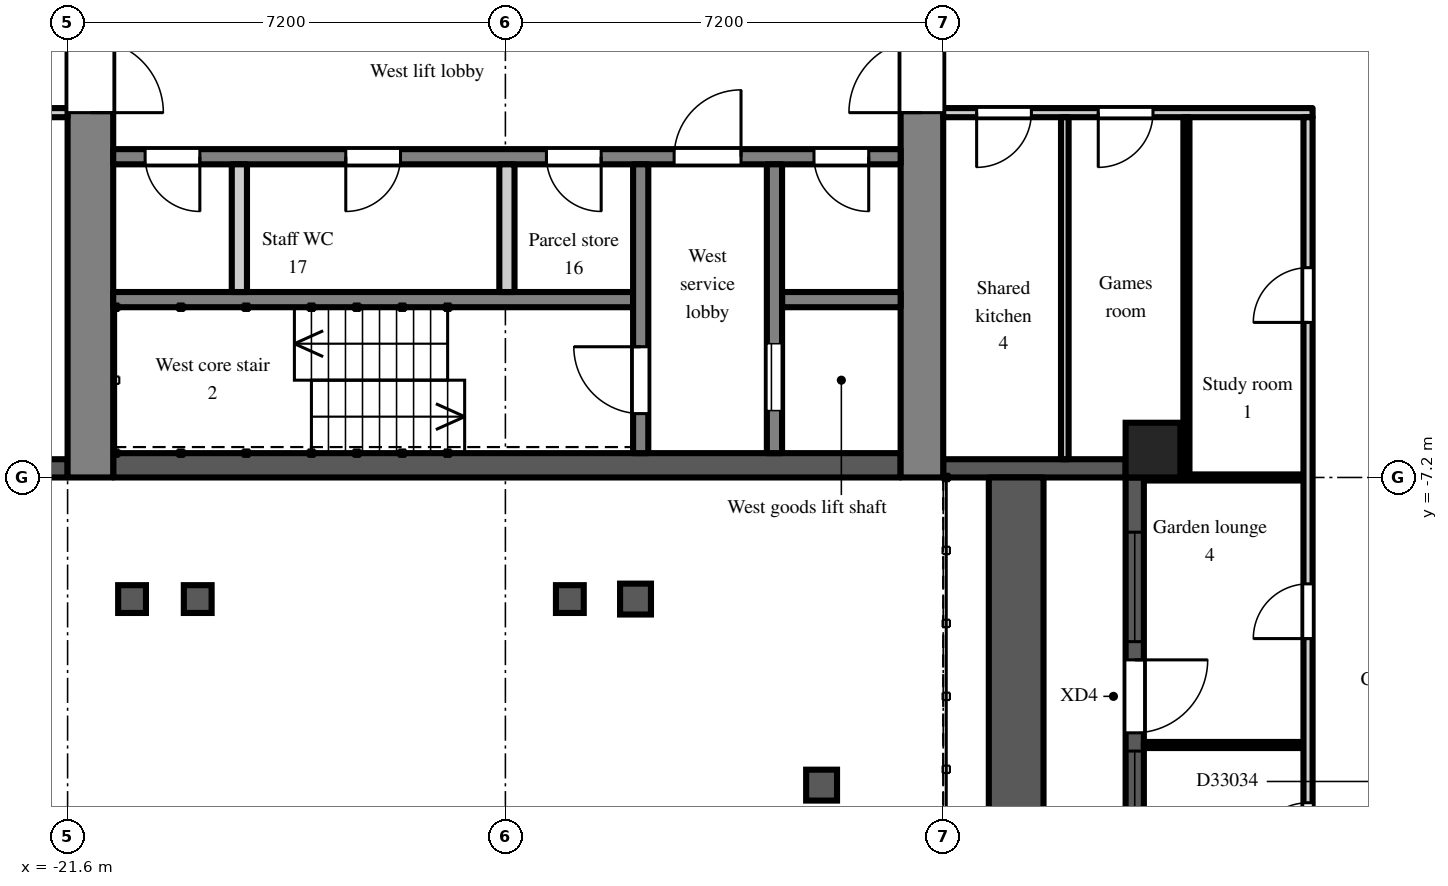
"""IFC4 building model, lengths in metres.
Left out: names, types, materials, properties, quantities, classifications, styles, units other than length and angle.
Written with IfcOpenShell. Run it as: python <this file> out.ifc"""

import sys

from ifc_helpers import new_model, si_unit, direction, frame, frame_2d, origin, origin_2d, place, context, subcontext, project, spatial, rectangle, extrude, element, fill, save


model = new_model("IFC4")
c1 = context("Model", 3, precision=1e-05, world=origin(), true_north=direction((0.0, 1.0)))
c2 = subcontext(c1, "Body", "Model", "MODEL_VIEW")
j1 = project(units=[si_unit("LENGTHUNIT", "METRE"), si_unit("PLANEANGLEUNIT", "RADIAN")], contexts=[c1])
p1 = place(None, origin())
s1 = spatial("IfcSite", under=j1, at=p1, CompositionType="ELEMENT")
p2 = place(p1, origin())
s2 = spatial("IfcBuilding", under=s1, at=p2, CompositionType="ELEMENT")
p3 = place(p2, frame((0.0, 0.0, 231.9)))
s3 = spatial("IfcBuildingStorey", under=s2, at=p3, CompositionType="ELEMENT", Elevation=231.9)
p4 = place(p3, frame((-3.75, -6.75, 0.0), z_axis=(0.0, 0.0, 1.0), x_axis=(1.0, 0.0, 0.0)))
e1 = element("IfcColumn", 1, at=p4, inside=s3, PredefinedType="COLUMN", context=c2, shape_type="SweptSolid", body=[
    extrude(rectangle(XDim=0.9, YDim=0.9, at=origin_2d()), origin(), (0.0, 0.0, 1.0), 3.0),
])
p5 = place(p3, frame((-24.3, -7.05, 0.0), z_axis=(0.0, 0.0, 1.0), x_axis=(1.0, 0.0, 0.0)))
e2 = element("IfcWall", 2, at=p5, inside=s3, PredefinedType="SOLIDWALL", context=c2, shape_type="SweptSolid", body=[
    extrude(rectangle(XDim=2.7, YDim=0.3, at=frame_2d((1.35, 0.0))), origin(), (0.0, 0.0, 1.0), 2.3),
])
p6 = place(p5, frame((0.75, 0.0, 0.2)))
e3 = element("IfcOpeningElement", 3, at=p6, cuts=e2, PredefinedType="OPENING", context=c2, shape_type="SweptSolid", body=[
    extrude(rectangle(XDim=1.2, YDim=1.85, at=frame_2d((0.6, 0.925))), frame((0.0, 0.16, 0.0), z_axis=(0.0, -1.0, 0.0), x_axis=(1.0, 0.0, 0.0)), (0.0, 0.0, 1.0), 0.32),
])
p7 = place(p3, frame((-7.2, -7.05, 0.0), z_axis=(0.0, 0.0, 1.0), x_axis=(1.0, 0.0, 0.0)))
e4 = element("IfcWall", 4, at=p7, inside=s3, PredefinedType="SOLIDWALL", context=c2, shape_type="SweptSolid", body=[
    extrude(rectangle(XDim=3.0, YDim=0.3, at=frame_2d((1.5, 0.0))), origin(), (0.0, 0.0, 1.0), 2.3),
])
p8 = place(p3, frame((-4.05, -7.2, 0.0), z_axis=(0.0, 0.0, 1.0), x_axis=(0.0, -1.0, 0.0)))
e5 = element("IfcWall", 5, at=p8, inside=s3, PredefinedType="SOLIDWALL", context=c2, shape_type="SweptSolid", body=[
    extrude(rectangle(XDim=7.2, YDim=0.3, at=frame_2d((3.6, 0.0))), origin(), (0.0, 0.0, 1.0), 2.3),
])
p9 = place(p8, frame((3.0, 0.0, 0.0)))
e6 = element("IfcOpeningElement", 6, at=p9, cuts=e5, PredefinedType="OPENING", context=c2, shape_type="SweptSolid", body=[
    extrude(rectangle(XDim=1.2, YDim=2.05, at=frame_2d((0.6, 1.025))), frame((0.0, 0.16, 0.0), z_axis=(0.0, -1.0, 0.0), x_axis=(1.0, 0.0, 0.0)), (0.0, 0.0, 1.0), 0.32),
])
p10 = place(p8, frame((0.9, 0.0, 0.2)))
e7 = element("IfcOpeningElement", 7, at=p10, cuts=e5, PredefinedType="OPENING", context=c2, shape_type="SweptSolid", body=[
    extrude(rectangle(XDim=1.8, YDim=1.85, at=frame_2d((0.9, 0.925))), frame((0.0, 0.16, 0.0), z_axis=(0.0, -1.0, 0.0), x_axis=(1.0, 0.0, 0.0)), (0.0, 0.0, 1.0), 0.32),
])
p11 = place(p8, frame((4.5, 0.0, 0.2)))
e8 = element("IfcOpeningElement", 8, at=p11, cuts=e5, PredefinedType="OPENING", context=c2, shape_type="SweptSolid", body=[
    extrude(rectangle(XDim=1.8, YDim=1.85, at=frame_2d((0.9, 0.925))), frame((0.0, 0.16, 0.0), z_axis=(0.0, -1.0, 0.0), x_axis=(1.0, 0.0, 0.0)), (0.0, 0.0, 1.0), 0.32),
])
p12 = place(p3, frame((-6.0, -14.4, 0.0), z_axis=(0.0, 0.0, 1.0), x_axis=(0.0, 1.0, 0.0)))
e9 = element("IfcWall", 9, at=p12, inside=s3, PredefinedType="PARAPET", context=c2, shape_type="SweptSolid", body=[
    extrude(rectangle(XDim=7.2, YDim=0.9, at=frame_2d((3.6, 0.0))), origin(), (0.0, 0.0, 1.0), 0.8),
])
p13 = place(p3, frame((-7.55, -7.2, 0.0), z_axis=(0.0, 0.0, 1.0), x_axis=(0.0, 1.0, 0.0)))
e10 = element("IfcWall", 10, at=p13, inside=s3, PredefinedType="SHEAR", context=c2, shape_type="SweptSolid", body=[
    extrude(rectangle(XDim=14.4, YDim=0.7, at=frame_2d((7.2, 0.0))), origin(), (0.0, 0.0, 1.0), 2.6),
])
p14 = place(p13, frame((6.0, 0.0, 0.0)))
e11 = element("IfcOpeningElement", 11, at=p14, cuts=e10, PredefinedType="OPENING", context=c2, shape_type="SweptSolid", body=[
    extrude(rectangle(XDim=2.4, YDim=2.2, at=frame_2d((1.2, 1.1))), frame((0.0, 0.36, 0.0), z_axis=(0.0, -1.0, 0.0), x_axis=(1.0, 0.0, 0.0)), (0.0, 0.0, 1.0), 0.72),
])
p15 = place(p3, frame((-21.225, -7.2, 0.0), z_axis=(0.0, 0.0, 1.0), x_axis=(0.0, 1.0, 0.0)))
e12 = element("IfcWall", 12, at=p15, inside=s3, PredefinedType="SHEAR", context=c2, shape_type="SweptSolid", body=[
    extrude(rectangle(XDim=14.4, YDim=0.75, at=frame_2d((7.2, 0.0))), origin(), (0.0, 0.0, 1.0), 2.6),
])
p16 = place(p15, frame((6.0, 0.0, 0.0)))
e13 = element("IfcOpeningElement", 13, at=p16, cuts=e12, PredefinedType="OPENING", context=c2, shape_type="SweptSolid", body=[
    extrude(rectangle(XDim=2.4, YDim=2.2, at=frame_2d((1.2, 1.1))), frame((0.0, 0.385, 0.0), z_axis=(0.0, -1.0, 0.0), x_axis=(1.0, 0.0, 0.0)), (0.0, 0.0, 1.0), 0.77),
])
p17 = place(p3, frame((-7.9, -7.0, 0.0), z_axis=(0.0, 0.0, 1.0), x_axis=(-1.0, 0.0, 0.0)))
e14 = element("IfcWall", 14, at=p17, inside=s3, PredefinedType="SHEAR", context=c2, shape_type="SweptSolid", body=[
    extrude(rectangle(XDim=12.95, YDim=0.4, at=frame_2d((6.475, 0.0))), origin(), (0.0, 0.0, 1.0), 2.6),
])
p18 = place(p3, frame((-7.9, -1.925, 0.0), z_axis=(0.0, 0.0, 1.0), x_axis=(-1.0, 0.0, 0.0)))
e15 = element("IfcWall", 15, at=p18, inside=s3, PredefinedType="SHEAR", context=c2, shape_type="SweptSolid", body=[
    extrude(rectangle(XDim=12.95, YDim=0.25, at=frame_2d((6.475, 0.0))), origin(), (0.0, 0.0, 1.0), 2.6),
])
p19 = place(p18, frame((0.525, 0.0, 0.0)))
e16 = element("IfcOpeningElement", 16, at=p19, cuts=e15, PredefinedType="OPENING", context=c2, shape_type="SweptSolid", body=[
    extrude(rectangle(XDim=0.9, YDim=2.1, at=frame_2d((0.45, 1.05))), frame((0.0, 0.135, 0.0), z_axis=(0.0, -1.0, 0.0), x_axis=(1.0, 0.0, 0.0)), (0.0, 0.0, 1.0), 0.27),
])
p20 = place(p18, frame((2.625, 0.0, 0.0)))
e17 = element("IfcOpeningElement", 17, at=p20, cuts=e15, PredefinedType="OPENING", context=c2, shape_type="SweptSolid", body=[
    extrude(rectangle(XDim=1.1, YDim=2.1, at=frame_2d((0.55, 1.05))), frame((0.0, 0.135, 0.0), z_axis=(0.0, -1.0, 0.0), x_axis=(1.0, 0.0, 0.0)), (0.0, 0.0, 1.0), 0.27),
])
p21 = place(p18, frame((4.925, 0.0, 0.0)))
e18 = element("IfcOpeningElement", 18, at=p21, cuts=e15, PredefinedType="OPENING", context=c2, shape_type="SweptSolid", body=[
    extrude(rectangle(XDim=0.9, YDim=2.1, at=frame_2d((0.45, 1.05))), frame((0.0, 0.135, 0.0), z_axis=(0.0, -1.0, 0.0), x_axis=(1.0, 0.0, 0.0)), (0.0, 0.0, 1.0), 0.27),
])
p22 = place(p18, frame((8.225, 0.0, 0.0)))
e19 = element("IfcOpeningElement", 19, at=p22, cuts=e15, PredefinedType="OPENING", context=c2, shape_type="SweptSolid", body=[
    extrude(rectangle(XDim=0.9, YDim=2.1, at=frame_2d((0.45, 1.05))), frame((0.0, 0.135, 0.0), z_axis=(0.0, -1.0, 0.0), x_axis=(1.0, 0.0, 0.0)), (0.0, 0.0, 1.0), 0.27),
])
p23 = place(p18, frame((11.525, 0.0, 0.0)))
e20 = element("IfcOpeningElement", 20, at=p23, cuts=e15, PredefinedType="OPENING", context=c2, shape_type="SweptSolid", body=[
    extrude(rectangle(XDim=0.9, YDim=2.1, at=frame_2d((0.45, 1.05))), frame((0.0, 0.135, 0.0), z_axis=(0.0, -1.0, 0.0), x_axis=(1.0, 0.0, 0.0)), (0.0, 0.0, 1.0), 0.27),
])
p24 = place(p3, frame((-7.9, -4.275, 0.0), z_axis=(0.0, 0.0, 1.0), x_axis=(-1.0, 0.0, 0.0)))
e21 = element("IfcWall", 21, at=p24, inside=s3, PredefinedType="SHEAR", context=c2, shape_type="SweptSolid", body=[
    extrude(rectangle(XDim=1.95, YDim=0.25, at=frame_2d((0.975, 0.0))), origin(), (0.0, 0.0, 1.0), 2.6),
])
p25 = place(p3, frame((-12.3, -4.275, 0.0), z_axis=(0.0, 0.0, 1.0), x_axis=(-1.0, 0.0, 0.0)))
e22 = element("IfcWall", 22, at=p25, inside=s3, PredefinedType="SHEAR", context=c2, shape_type="SweptSolid", body=[
    extrude(rectangle(XDim=8.55, YDim=0.25, at=frame_2d((4.275, 0.0))), origin(), (0.0, 0.0, 1.0), 2.6),
])
p26 = place(p3, frame((-9.975, -2.05, 0.0), z_axis=(0.0, 0.0, 1.0), x_axis=(0.0, -1.0, 0.0)))
e23 = element("IfcWall", 23, at=p26, inside=s3, PredefinedType="SHEAR", context=c2, shape_type="SweptSolid", body=[
    extrude(rectangle(XDim=4.75, YDim=0.25, at=frame_2d((2.375, 0.0))), origin(), (0.0, 0.0, 1.0), 2.6),
])
p27 = place(p26, frame((2.95, 0.0, 0.0)))
e24 = element("IfcOpeningElement", 24, at=p27, cuts=e23, PredefinedType="OPENING", context=c2, shape_type="SweptSolid", body=[
    extrude(rectangle(XDim=1.1, YDim=2.1, at=frame_2d((0.55, 1.05))), frame((0.0, 0.135, 0.0), z_axis=(0.0, -1.0, 0.0), x_axis=(1.0, 0.0, 0.0)), (0.0, 0.0, 1.0), 0.27),
])
p28 = place(p3, frame((-12.175, -2.05, 0.0), z_axis=(0.0, 0.0, 1.0), x_axis=(0.0, -1.0, 0.0)))
e25 = element("IfcWall", 25, at=p28, inside=s3, PredefinedType="SHEAR", context=c2, shape_type="SweptSolid", body=[
    extrude(rectangle(XDim=4.75, YDim=0.25, at=frame_2d((2.375, 0.0))), origin(), (0.0, 0.0, 1.0), 2.6),
])
p29 = place(p28, frame((3.0, 0.0, 0.0)))
e26 = element("IfcOpeningElement", 26, at=p29, cuts=e25, PredefinedType="OPENING", context=c2, shape_type="SweptSolid", body=[
    extrude(rectangle(XDim=1.1, YDim=2.1, at=frame_2d((0.55, 1.05))), frame((0.0, 0.135, 0.0), z_axis=(0.0, -1.0, 0.0), x_axis=(1.0, 0.0, 0.0)), (0.0, 0.0, 1.0), 0.27),
])
for number, where, z_axis, x_axis in (
    (27, (-14.375, -2.05, 0.0), (0.0, 0.0, 1.0), (0.0, -1.0, 0.0)),
    (28, (-18.775, -2.05, 0.0), (0.0, 0.0, 1.0), (0.0, -1.0, 0.0)),
):
    element("IfcWall", number, at=place(p3, frame(where, z_axis=z_axis, x_axis=x_axis)), inside=s3, PredefinedType="PARTITIONING", context=c2, shape_type="SweptSolid", body=[
        extrude(rectangle(XDim=2.1, YDim=0.25, at=frame_2d((1.05, 0.0))), origin(), (0.0, 0.0, 1.0), 2.6),
    ])
p30 = place(p3, frame((-26.725, -1.2, 0.0), z_axis=(0.0, 0.0, 1.0), x_axis=(1.0, 0.0, 0.0)))
e29 = element("IfcWall", 29, at=p30, inside=s3, PredefinedType="PARTITIONING", context=c2, shape_type="SweptSolid", body=[
    extrude(rectangle(XDim=5.125, YDim=0.15, at=frame_2d((2.562, 0.0))), origin(), (0.0, 0.0, 1.0), 2.6),
])
p31 = place(p30, frame((3.525, 0.0, 0.0)))
e30 = element("IfcOpeningElement", 30, at=p31, cuts=e29, PredefinedType="OPENING", context=c2, shape_type="SweptSolid", body=[
    extrude(rectangle(XDim=1.0, YDim=2.1, at=frame_2d((0.5, 1.05))), frame((0.0, 0.085, 0.0), z_axis=(0.0, -1.0, 0.0), x_axis=(1.0, 0.0, 0.0)), (0.0, 0.0, 1.0), 0.17),
])
p32 = place(p3, frame((-7.2, -1.2, 0.0), z_axis=(0.0, 0.0, 1.0), x_axis=(1.0, 0.0, 0.0)))
e31 = element("IfcWall", 31, at=p32, inside=s3, PredefinedType="PARTITIONING", context=c2, shape_type="SweptSolid", body=[
    extrude(rectangle(XDim=6.075, YDim=0.15, at=frame_2d((3.038, 0.0))), origin(), (0.0, 0.0, 1.0), 2.6),
])
p33 = place(p32, frame((2.55, 0.0, 0.0)))
e32 = element("IfcOpeningElement", 32, at=p33, cuts=e31, PredefinedType="OPENING", context=c2, shape_type="SweptSolid", body=[
    extrude(rectangle(XDim=0.9, YDim=2.1, at=frame_2d((0.45, 1.05))), frame((0.0, 0.085, 0.0), z_axis=(0.0, -1.0, 0.0), x_axis=(1.0, 0.0, 0.0)), (0.0, 0.0, 1.0), 0.17),
])
p34 = place(p32, frame((0.55, 0.0, 0.0)))
e33 = element("IfcOpeningElement", 33, at=p34, cuts=e31, PredefinedType="OPENING", context=c2, shape_type="SweptSolid", body=[
    extrude(rectangle(XDim=0.9, YDim=2.1, at=frame_2d((0.45, 1.05))), frame((0.0, 0.085, 0.0), z_axis=(0.0, -1.0, 0.0), x_axis=(1.0, 0.0, 0.0)), (0.0, 0.0, 1.0), 0.17),
])
p35 = place(p3, frame((-5.2, -6.9, 0.0), z_axis=(0.0, 0.0, 1.0), x_axis=(0.0, 1.0, 0.0)))
e34 = element("IfcWall", 34, at=p35, inside=s3, PredefinedType="PARTITIONING", context=c2, shape_type="SweptSolid", body=[
    extrude(rectangle(XDim=5.625, YDim=0.125, at=frame_2d((2.812, 0.0))), origin(), (0.0, 0.0, 1.0), 2.6),
])
for number, where, z_axis, x_axis in (
    (35, (-3.9, -11.6, 0.0), (0.0, 0.0, 1.0), (1.0, 0.0, 0.0)),
    (36, (-3.9, -7.2, 0.0), (0.0, 0.0, 1.0), (1.0, 0.0, 0.0)),
):
    element("IfcWall", number, at=place(p3, frame(where, z_axis=z_axis, x_axis=x_axis)), inside=s3, PredefinedType="PARTITIONING", context=c2, shape_type="SweptSolid", body=[
        extrude(rectangle(XDim=2.625, YDim=0.1, at=frame_2d((1.312, 0.0))), origin(), (0.0, 0.0, 1.0), 2.6),
    ])
p36 = place(p3, frame((-3.2, -7.15, 0.0), z_axis=(0.0, 0.0, 1.0), x_axis=(0.0, 1.0, 0.0)))
e37 = element("IfcWall", 37, at=p36, inside=s3, PredefinedType="PARTITIONING", context=c2, shape_type="SweptSolid", body=[
    extrude(rectangle(XDim=5.875, YDim=0.1, at=frame_2d((2.938, 0.0))), origin(), (0.0, 0.0, 1.0), 2.6),
])
p37 = place(p3, frame((-1.2, -19.525, 0.0), z_axis=(0.0, 0.0, 1.0), x_axis=(0.0, 1.0, 0.0)))
e38 = element("IfcWall", 38, at=p37, inside=s3, PredefinedType="PARTITIONING", context=c2, shape_type="SweptSolid", body=[
    extrude(rectangle(XDim=18.25, YDim=0.15, at=frame_2d((9.125, 0.0))), origin(), (0.0, 0.0, 1.0), 2.6),
])
p38 = place(p37, frame((14.875, 0.0, 0.0)))
e39 = element("IfcOpeningElement", 39, at=p38, cuts=e38, PredefinedType="OPENING", context=c2, shape_type="SweptSolid", body=[
    extrude(rectangle(XDim=0.9, YDim=2.1, at=frame_2d((0.45, 1.05))), frame((0.0, 0.085, 0.0), z_axis=(0.0, -1.0, 0.0), x_axis=(1.0, 0.0, 0.0)), (0.0, 0.0, 1.0), 0.17),
])
p39 = place(p37, frame((6.075, 0.0, 0.0)))
e40 = element("IfcOpeningElement", 40, at=p39, cuts=e38, PredefinedType="OPENING", context=c2, shape_type="SweptSolid", body=[
    extrude(rectangle(XDim=0.9, YDim=2.1, at=frame_2d((0.45, 1.05))), frame((0.0, 0.085, 0.0), z_axis=(0.0, -1.0, 0.0), x_axis=(1.0, 0.0, 0.0)), (0.0, 0.0, 1.0), 0.17),
])
p40 = place(p37, frame((9.675, 0.0, 0.0)))
e41 = element("IfcOpeningElement", 41, at=p40, cuts=e38, PredefinedType="OPENING", context=c2, shape_type="SweptSolid", body=[
    extrude(rectangle(XDim=0.9, YDim=2.1, at=frame_2d((0.45, 1.05))), frame((0.0, 0.085, 0.0), z_axis=(0.0, -1.0, 0.0), x_axis=(1.0, 0.0, 0.0)), (0.0, 0.0, 1.0), 0.17),
])
p41 = place(p37, frame((3.925, 0.0, 0.0)))
e42 = element("IfcOpeningElement", 42, at=p41, cuts=e38, PredefinedType="OPENING", context=c2, shape_type="SweptSolid", body=[
    extrude(rectangle(XDim=1.0, YDim=2.1, at=frame_2d((0.5, 1.05))), frame((0.0, 0.085, 0.0), z_axis=(0.0, -1.0, 0.0), x_axis=(1.0, 0.0, 0.0)), (0.0, 0.0, 1.0), 0.17),
])
p42 = place(p9, origin())
e43 = element("IfcDoor", 43, at=p42, inside=s3, OperationType="SINGLE_SWING_LEFT", PredefinedType="DOOR", context=c2, shape_type="SweptSolid", body=[
    extrude(rectangle(XDim=1.2, YDim=2.05, at=frame_2d((0.6, 1.025))), frame((0.0, 0.025, 0.0), z_axis=(0.0, -1.0, 0.0), x_axis=(1.0, 0.0, 0.0)), (0.0, 0.0, 1.0), 0.05),
])
fill(e6, e43)
p43 = place(p10, origin())
e44 = element("IfcWindow", 44, at=p43, inside=s3, PartitioningType="SINGLE_PANEL", PredefinedType="WINDOW", context=c2, shape_type="SweptSolid", body=[
    extrude(rectangle(XDim=1.8, YDim=1.85, at=frame_2d((0.9, 0.925))), frame((0.0, 0.03, 0.0), z_axis=(0.0, -1.0, 0.0), x_axis=(1.0, 0.0, 0.0)), (0.0, 0.0, 1.0), 0.06),
])
fill(e7, e44)
p44 = place(p11, origin())
e45 = element("IfcWindow", 45, at=p44, inside=s3, PartitioningType="SINGLE_PANEL", PredefinedType="WINDOW", context=c2, shape_type="SweptSolid", body=[
    extrude(rectangle(XDim=1.8, YDim=1.85, at=frame_2d((0.9, 0.925))), frame((0.0, 0.03, 0.0), z_axis=(0.0, -1.0, 0.0), x_axis=(1.0, 0.0, 0.0)), (0.0, 0.0, 1.0), 0.06),
])
fill(e8, e45)
p45 = place(p27, origin())
e46 = element("IfcDoor", 46, at=p45, inside=s3, OperationType="SLIDING_TO_LEFT", PredefinedType="DOOR", context=c2, shape_type="SweptSolid", body=[
    extrude(rectangle(XDim=1.1, YDim=2.1, at=frame_2d((0.55, 1.05))), frame((0.0, 0.025, 0.0), z_axis=(0.0, -1.0, 0.0), x_axis=(1.0, 0.0, 0.0)), (0.0, 0.0, 1.0), 0.05),
])
fill(e24, e46)
p46 = place(p29, frame((1.1, 0.0, 0.0), z_axis=(0.0, 0.0, 1.0), x_axis=(-1.0, 0.0, 0.0)))
e47 = element("IfcDoor", 47, at=p46, inside=s3, OperationType="SINGLE_SWING_RIGHT", PredefinedType="DOOR", context=c2, shape_type="SweptSolid", body=[
    extrude(rectangle(XDim=1.1, YDim=2.1, at=frame_2d((0.55, 1.05))), frame((0.0, 0.025, 0.0), z_axis=(0.0, -1.0, 0.0), x_axis=(1.0, 0.0, 0.0)), (0.0, 0.0, 1.0), 0.05),
])
fill(e26, e47)
p47 = place(p19, origin())
e48 = element("IfcDoor", 48, at=p47, inside=s3, OperationType="SINGLE_SWING_LEFT", PredefinedType="DOOR", context=c2, shape_type="SweptSolid", body=[
    extrude(rectangle(XDim=0.9, YDim=2.1, at=frame_2d((0.45, 1.05))), frame((0.0, 0.025, 0.0), z_axis=(0.0, -1.0, 0.0), x_axis=(1.0, 0.0, 0.0)), (0.0, 0.0, 1.0), 0.05),
])
fill(e16, e48)
p48 = place(p20, frame((1.1, 0.0, 0.0), z_axis=(0.0, 0.0, 1.0), x_axis=(-1.0, 0.0, 0.0)))
e49 = element("IfcDoor", 49, at=p48, inside=s3, OperationType="SINGLE_SWING_RIGHT", PredefinedType="DOOR", context=c2, shape_type="SweptSolid", body=[
    extrude(rectangle(XDim=1.1, YDim=2.1, at=frame_2d((0.55, 1.05))), frame((0.0, 0.025, 0.0), z_axis=(0.0, -1.0, 0.0), x_axis=(1.0, 0.0, 0.0)), (0.0, 0.0, 1.0), 0.05),
])
fill(e17, e49)
p49 = place(p14, origin())
e50 = element("IfcDoor", 50, at=p49, inside=s3, OperationType="DOUBLE_DOOR_DOUBLE_SWING", PredefinedType="DOOR", context=c2, shape_type="SweptSolid", body=[
    extrude(rectangle(XDim=2.4, YDim=2.2, at=frame_2d((1.2, 1.1))), frame((0.0, 0.025, 0.0), z_axis=(0.0, -1.0, 0.0), x_axis=(1.0, 0.0, 0.0)), (0.0, 0.0, 1.0), 0.05),
])
fill(e11, e50)
p50 = place(p16, frame((2.4, 0.0, 0.0), z_axis=(0.0, 0.0, 1.0), x_axis=(-1.0, 0.0, 0.0)))
e51 = element("IfcDoor", 51, at=p50, inside=s3, OperationType="DOUBLE_DOOR_DOUBLE_SWING", PredefinedType="DOOR", context=c2, shape_type="SweptSolid", body=[
    extrude(rectangle(XDim=2.4, YDim=2.2, at=frame_2d((1.2, 1.1))), frame((0.0, 0.025, 0.0), z_axis=(0.0, -1.0, 0.0), x_axis=(1.0, 0.0, 0.0)), (0.0, 0.0, 1.0), 0.05),
])
fill(e13, e51)
p51 = place(p21, origin())
e52 = element("IfcDoor", 52, at=p51, inside=s3, OperationType="SINGLE_SWING_LEFT", PredefinedType="DOOR", context=c2, shape_type="SweptSolid", body=[
    extrude(rectangle(XDim=0.9, YDim=2.1, at=frame_2d((0.45, 1.05))), frame((0.0, 0.025, 0.0), z_axis=(0.0, -1.0, 0.0), x_axis=(1.0, 0.0, 0.0)), (0.0, 0.0, 1.0), 0.05),
])
fill(e18, e52)
p52 = place(p22, origin())
e53 = element("IfcDoor", 53, at=p52, inside=s3, OperationType="SINGLE_SWING_RIGHT", PredefinedType="DOOR", context=c2, shape_type="SweptSolid", body=[
    extrude(rectangle(XDim=0.9, YDim=2.1, at=frame_2d((0.45, 1.05))), frame((0.0, 0.025, 0.0), z_axis=(0.0, -1.0, 0.0), x_axis=(1.0, 0.0, 0.0)), (0.0, 0.0, 1.0), 0.05),
])
fill(e19, e53)
p53 = place(p23, origin())
e54 = element("IfcDoor", 54, at=p53, inside=s3, OperationType="SINGLE_SWING_LEFT", PredefinedType="DOOR", context=c2, shape_type="SweptSolid", body=[
    extrude(rectangle(XDim=0.9, YDim=2.1, at=frame_2d((0.45, 1.05))), frame((0.0, 0.025, 0.0), z_axis=(0.0, -1.0, 0.0), x_axis=(1.0, 0.0, 0.0)), (0.0, 0.0, 1.0), 0.05),
])
fill(e20, e54)
p54 = place(p38, origin())
e55 = element("IfcDoor", 55, at=p54, inside=s3, OperationType="SINGLE_SWING_LEFT", PredefinedType="DOOR", context=c2, shape_type="SweptSolid", body=[
    extrude(rectangle(XDim=0.9, YDim=2.1, at=frame_2d((0.45, 1.05))), frame((0.0, 0.025, 0.0), z_axis=(0.0, -1.0, 0.0), x_axis=(1.0, 0.0, 0.0)), (0.0, 0.0, 1.0), 0.05),
])
fill(e39, e55)
p55 = place(p33, frame((0.9, 0.0, 0.0), z_axis=(0.0, 0.0, 1.0), x_axis=(-1.0, 0.0, 0.0)))
e56 = element("IfcDoor", 56, at=p55, inside=s3, OperationType="SINGLE_SWING_RIGHT", PredefinedType="DOOR", context=c2, shape_type="SweptSolid", body=[
    extrude(rectangle(XDim=0.9, YDim=2.1, at=frame_2d((0.45, 1.05))), frame((0.0, 0.025, 0.0), z_axis=(0.0, -1.0, 0.0), x_axis=(1.0, 0.0, 0.0)), (0.0, 0.0, 1.0), 0.05),
])
fill(e32, e56)
p56 = place(p34, frame((0.9, 0.0, 0.0), z_axis=(0.0, 0.0, 1.0), x_axis=(-1.0, 0.0, 0.0)))
e57 = element("IfcDoor", 57, at=p56, inside=s3, OperationType="SINGLE_SWING_RIGHT", PredefinedType="DOOR", context=c2, shape_type="SweptSolid", body=[
    extrude(rectangle(XDim=0.9, YDim=2.1, at=frame_2d((0.45, 1.05))), frame((0.0, 0.025, 0.0), z_axis=(0.0, -1.0, 0.0), x_axis=(1.0, 0.0, 0.0)), (0.0, 0.0, 1.0), 0.05),
])
fill(e33, e57)
p57 = place(p39, origin())
e58 = element("IfcDoor", 58, at=p57, inside=s3, OperationType="SINGLE_SWING_LEFT", PredefinedType="DOOR", context=c2, shape_type="SweptSolid", body=[
    extrude(rectangle(XDim=0.9, YDim=2.1, at=frame_2d((0.45, 1.05))), frame((0.0, 0.025, 0.0), z_axis=(0.0, -1.0, 0.0), x_axis=(1.0, 0.0, 0.0)), (0.0, 0.0, 1.0), 0.05),
])
fill(e40, e58)
p58 = place(p40, origin())
e59 = element("IfcDoor", 59, at=p58, inside=s3, OperationType="SINGLE_SWING_LEFT", PredefinedType="DOOR", context=c2, shape_type="SweptSolid", body=[
    extrude(rectangle(XDim=0.9, YDim=2.1, at=frame_2d((0.45, 1.05))), frame((0.0, 0.025, 0.0), z_axis=(0.0, -1.0, 0.0), x_axis=(1.0, 0.0, 0.0)), (0.0, 0.0, 1.0), 0.05),
])
fill(e41, e59)
save(model, sys.argv[1])
